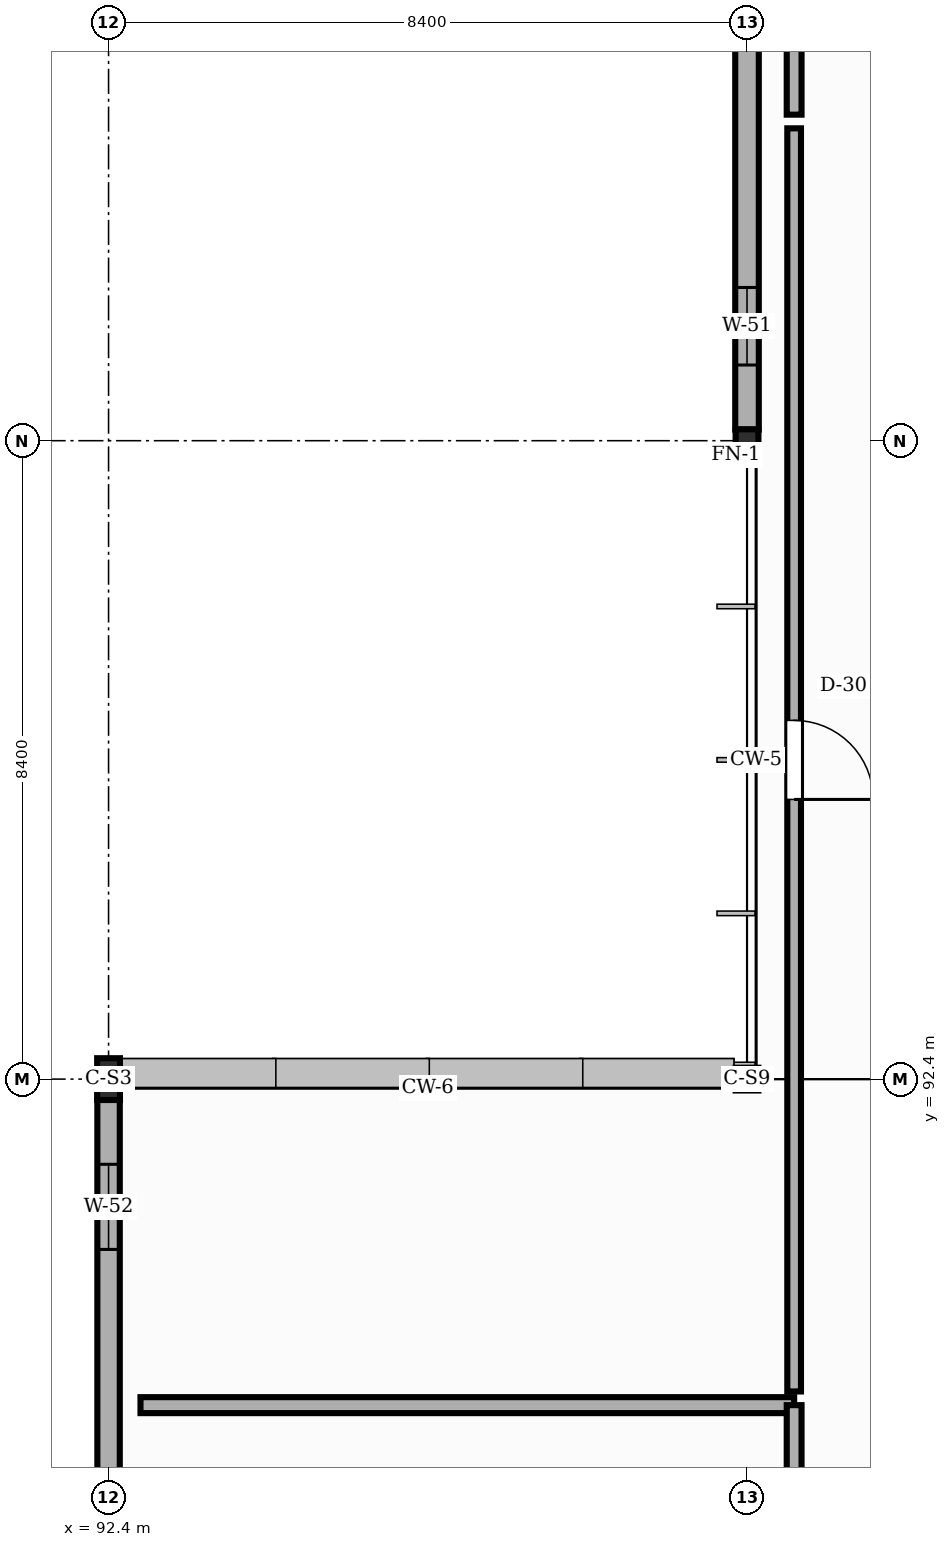
"""IFC4 building model, lengths in metres.
Left out: names, types, materials, properties, quantities, classifications, styles, units other than length and angle.
Written with IfcOpenShell. Run it as: python <this file> out.ifc"""

import sys

from ifc_helpers import new_model, si_unit, direction, frame, frame_2d, origin, origin_2d, place, context, subcontext, project, spatial, rectangle, i_section, extrude, element, fill, save


model = new_model("IFC4")
c1 = context("Model", 3, precision=1e-05, world=origin(), true_north=direction((0.0, 1.0)))
c2 = subcontext(c1, "Body", "Model", "MODEL_VIEW")
j1 = project(units=[si_unit("LENGTHUNIT", "METRE"), si_unit("PLANEANGLEUNIT", "RADIAN")], contexts=[c1])
p1 = place(None, origin())
s1 = spatial("IfcSite", under=j1, at=p1, CompositionType="ELEMENT")
p2 = place(p1, origin())
s2 = spatial("IfcBuilding", under=s1, at=p2, CompositionType="ELEMENT")
p3 = place(p2, frame((0.0, 0.0, 18.0)))
s3 = spatial("IfcBuildingStorey", under=s2, at=p3, CompositionType="ELEMENT", Elevation=18.0)
p4 = place(p3, frame((92.4, 92.4, 0.0), z_axis=(0.0, 0.0, 1.0), x_axis=(1.0, 0.0, 0.0)))
e1 = element("IfcColumn", 1, at=p4, inside=s3, PredefinedType="COLUMN", context=c2, shape_type="SweptSolid", body=[
    extrude(i_section(OverallWidth=0.3, OverallDepth=0.55, WebThickness=0.015, FlangeThickness=0.029, FilletRadius=0.027, at=origin_2d()), origin(), (0.0, 0.0, 1.0), 4.05),
])
for number, where, z_axis, x_axis in (
    (2, (100.8, 92.4, 0.0), (0.0, 0.0, 1.0), (1.0, 0.0, 0.0)),
    (3, (100.8, 100.8, 0.0), (0.0, 0.0, 1.0), (1.0, 0.0, 0.0)),
):
    element("IfcColumn", number, at=place(p3, frame(where, z_axis=z_axis, x_axis=x_axis)), inside=s3, PredefinedType="COLUMN", context=c2, shape_type="SweptSolid", body=[
        extrude(i_section(OverallWidth=0.3, OverallDepth=0.3, WebThickness=0.011, FlangeThickness=0.019, FilletRadius=0.027, at=origin_2d()), origin(), (0.0, 0.0, 1.0), 4.05),
    ])
p5 = place(p3, frame((100.8, 109.054, 0.0), z_axis=(0.0, 0.0, 1.0), x_axis=(0.0, -1.0, 0.0)))
e4 = element("IfcWall", 4, at=p5, inside=s3, PredefinedType="STANDARD", context=c2, shape_type="SweptSolid", body=[
    extrude(rectangle(XDim=8.108, YDim=0.31, at=frame_2d((4.054, 0.0))), origin(), (0.0, 0.0, 1.0), 3.472),
])
p6 = place(p5, frame((0.85, 0.0, 0.9)))
e5 = element("IfcOpeningElement", 5, at=p6, cuts=e4, PredefinedType="OPENING", context=c2, shape_type="SweptSolid", body=[
    extrude(rectangle(XDim=1.92, YDim=1.85, at=frame_2d((0.96, 0.925))), frame((0.0, 0.165, 0.0), z_axis=(0.0, -1.0, 0.0), x_axis=(1.0, 0.0, 0.0)), (0.0, 0.0, 1.0), 0.33),
])
p7 = place(p5, frame((6.238, 0.0, 0.9)))
e6 = element("IfcOpeningElement", 6, at=p7, cuts=e4, PredefinedType="OPENING", context=c2, shape_type="SweptSolid", body=[
    extrude(rectangle(XDim=1.02, YDim=2.05, at=frame_2d((0.51, 1.025))), frame((0.0, 0.165, 0.0), z_axis=(0.0, -1.0, 0.0), x_axis=(1.0, 0.0, 0.0)), (0.0, 0.0, 1.0), 0.33),
])
p8 = place(p3, frame((92.4, 92.129, 0.0), z_axis=(0.0, 0.0, 1.0), x_axis=(0.0, -1.0, 0.0)))
e7 = element("IfcWall", 7, at=p8, inside=s3, PredefinedType="STANDARD", context=c2, shape_type="SweptSolid", body=[
    extrude(rectangle(XDim=7.858, YDim=0.295, at=frame_2d((3.929, 0.0))), origin(), (0.0, 0.0, 1.0), 3.582),
])
p9 = place(p8, frame((0.85, 0.0, 0.9)))
e8 = element("IfcOpeningElement", 8, at=p9, cuts=e7, PredefinedType="OPENING", context=c2, shape_type="SweptSolid", body=[
    extrude(rectangle(XDim=1.12, YDim=2.05, at=frame_2d((0.56, 1.025))), frame((0.0, 0.157, 0.0), z_axis=(0.0, -1.0, 0.0), x_axis=(1.0, 0.0, 0.0)), (0.0, 0.0, 1.0), 0.315),
])
p10 = place(p8, frame((5.788, 0.0, 0.9)))
e9 = element("IfcOpeningElement", 9, at=p10, cuts=e7, PredefinedType="OPENING", context=c2, shape_type="SweptSolid", body=[
    extrude(rectangle(XDim=1.22, YDim=2.05, at=frame_2d((0.61, 1.025))), frame((0.0, 0.157, 0.0), z_axis=(0.0, -1.0, 0.0), x_axis=(1.0, 0.0, 0.0)), (0.0, 0.0, 1.0), 0.315),
])
p11 = place(p3, frame((92.82, 88.11, -0.004), z_axis=(0.0, 0.0, 1.0), x_axis=(1.0, 0.0, 0.0)))
e10 = element("IfcWall", 10, at=p11, inside=s3, PredefinedType="STANDARD", context=c2, shape_type="SweptSolid", body=[
    extrude(rectangle(XDim=8.6, YDim=0.21, at=frame_2d((4.3, 0.0))), origin(), (0.0, 0.0, 1.0), 3.854),
])
p12 = place(p3, frame((101.42, 88.11, -0.004), z_axis=(0.0, 0.0, 1.0), x_axis=(0.0, -1.0, 0.0)))
e11 = element("IfcWall", 11, at=p12, inside=s3, PredefinedType="STANDARD", context=c2, shape_type="SweptSolid", body=[
    extrude(rectangle(XDim=3.64, YDim=0.195, at=frame_2d((1.82, 0.0))), origin(), (0.0, 0.0, 1.0), 3.854),
])
p13 = place(p3, frame((101.42, 121.54, -0.004), z_axis=(0.0, 0.0, 1.0), x_axis=(0.0, -1.0, 0.0)))
e12 = element("IfcWall", 12, at=p13, inside=s3, PredefinedType="STANDARD", context=c2, shape_type="SweptSolid", body=[
    extrude(rectangle(XDim=16.45, YDim=0.195, at=frame_2d((8.225, 0.0))), origin(), (0.0, 0.0, 1.0), 3.854),
])
p14 = place(p3, frame((101.42, 104.91, -0.004), z_axis=(0.0, 0.0, 1.0), x_axis=(0.0, -1.0, 0.0)))
e13 = element("IfcWall", 13, at=p14, inside=s3, PredefinedType="STANDARD", context=c2, shape_type="SweptSolid", body=[
    extrude(rectangle(XDim=16.62, YDim=0.18, at=frame_2d((8.31, 0.0))), origin(), (0.0, 0.0, 1.0), 3.854),
])
p15 = place(p14, frame((7.79, 0.0, 0.0)))
e14 = element("IfcOpeningElement", 14, at=p15, cuts=e13, PredefinedType="OPENING", context=c2, shape_type="SweptSolid", body=[
    extrude(rectangle(XDim=1.04, YDim=2.3, at=frame_2d((0.52, 1.15))), frame((0.0, 0.1, 0.0), z_axis=(0.0, -1.0, 0.0), x_axis=(1.0, 0.0, 0.0)), (0.0, 0.0, 1.0), 0.2),
])
p16 = place(p7, origin())
e15 = element("IfcWindow", 15, at=p16, inside=s3, PartitioningType="SINGLE_PANEL", PredefinedType="WINDOW", context=c2, shape_type="SweptSolid", body=[
    extrude(rectangle(XDim=1.02, YDim=2.05, at=frame_2d((0.51, 1.025))), frame((0.0, 0.03, 0.0), z_axis=(0.0, -1.0, 0.0), x_axis=(1.0, 0.0, 0.0)), (0.0, 0.0, 1.0), 0.06),
])
fill(e6, e15)
p17 = place(p9, origin())
e16 = element("IfcWindow", 16, at=p17, inside=s3, PartitioningType="SINGLE_PANEL", PredefinedType="WINDOW", context=c2, shape_type="SweptSolid", body=[
    extrude(rectangle(XDim=1.12, YDim=2.05, at=frame_2d((0.56, 1.025))), frame((0.0, 0.03, 0.0), z_axis=(0.0, -1.0, 0.0), x_axis=(1.0, 0.0, 0.0)), (0.0, 0.0, 1.0), 0.06),
])
fill(e8, e16)
p18 = place(p15, origin())
e17 = element("IfcDoor", 17, at=p18, inside=s3, OperationType="SINGLE_SWING_RIGHT", PredefinedType="DOOR", context=c2, shape_type="SweptSolid", body=[
    extrude(rectangle(XDim=1.04, YDim=2.3, at=frame_2d((0.52, 1.15))), frame((0.0, 0.025, 0.0), z_axis=(0.0, -1.0, 0.0), x_axis=(1.0, 0.0, 0.0)), (0.0, 0.0, 1.0), 0.05),
])
fill(e14, e17)
save(model, sys.argv[1])
